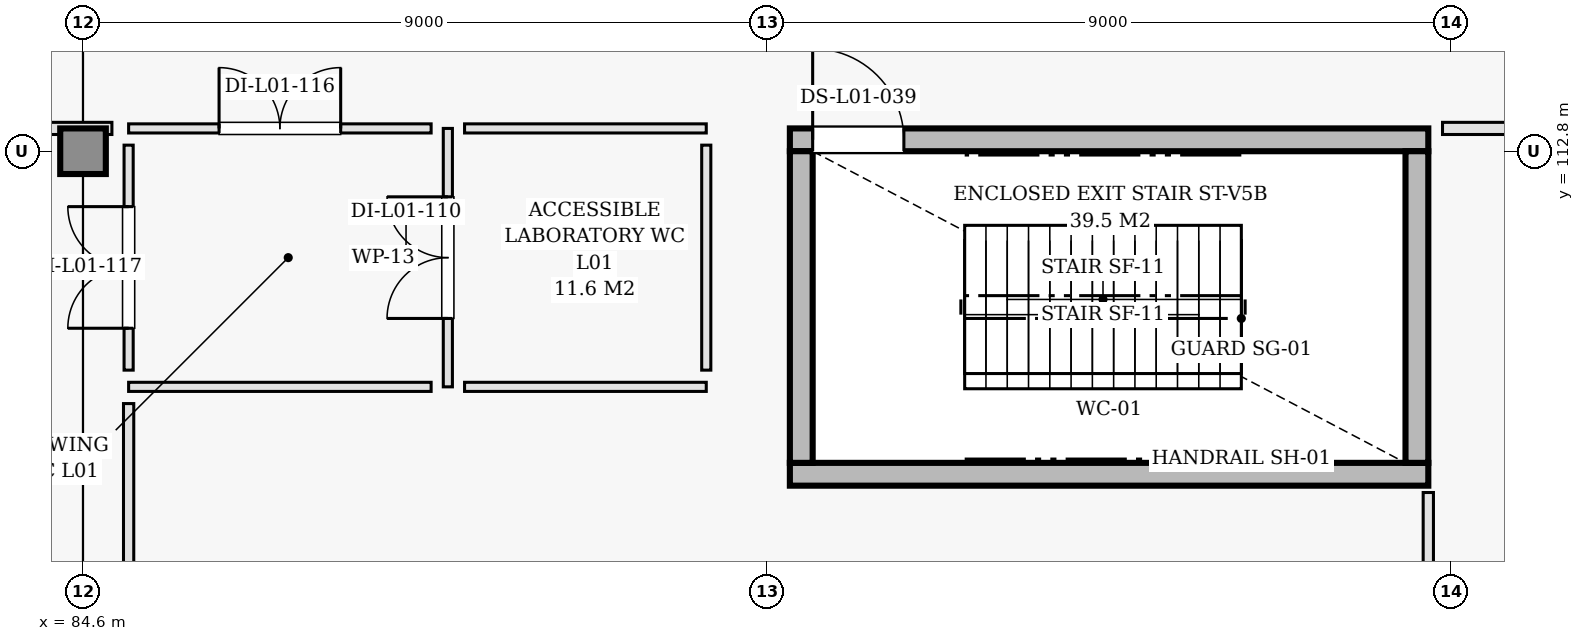
"""IFC4 building model, lengths in metres.
Left out: names, types, materials, properties, quantities, classifications, styles, units other than length and angle.
Written with IfcOpenShell. Run it as: python <this file> out.ifc"""

import sys

from ifc_helpers import new_model, si_unit, direction, frame, frame_2d, origin, origin_2d, place, context, subcontext, project, spatial, rectangle, extrude, element, fill, save


model = new_model("IFC4")
c1 = context("Model", 3, precision=1e-05, world=origin(), true_north=direction((0.0, 1.0)))
c2 = subcontext(c1, "Body", "Model", "MODEL_VIEW")
j1 = project(units=[si_unit("LENGTHUNIT", "METRE"), si_unit("PLANEANGLEUNIT", "RADIAN")], contexts=[c1])
p1 = place(None, origin())
s1 = spatial("IfcSite", under=j1, at=p1, CompositionType="ELEMENT")
p2 = place(p1, origin())
s2 = spatial("IfcBuilding", under=s1, at=p2, CompositionType="ELEMENT")
p3 = place(p2, frame((0.0, 0.0, 4.8)))
s3 = spatial("IfcBuildingStorey", under=s2, at=p3, CompositionType="ELEMENT", Elevation=4.8)
p4 = place(p3, frame((84.6, 112.8, 0.0), z_axis=(0.0, 0.0, 1.0), x_axis=(1.0, 0.0, 0.0)))
e1 = element("IfcColumn", 1, at=p4, inside=s3, PredefinedType="COLUMN", context=c2, shape_type="SweptSolid", body=[
    extrude(rectangle(XDim=0.6, YDim=0.6, at=origin_2d()), origin(), (0.0, 0.0, 1.0), 4.8),
])
p5 = place(p3, frame((93.9, 108.55, 0.0), z_axis=(0.0, 0.0, 1.0), x_axis=(1.0, 0.0, 0.0)))
e2 = element("IfcWall", 2, at=p5, inside=s3, PredefinedType="SHEAR", context=c2, shape_type="SweptSolid", body=[
    extrude(rectangle(XDim=8.4, YDim=0.3, at=frame_2d((4.2, 0.0))), origin(), (0.0, 0.0, 1.0), 4.48),
])
p6 = place(p3, frame((93.9, 112.95, 0.0), z_axis=(0.0, 0.0, 1.0), x_axis=(1.0, 0.0, 0.0)))
e3 = element("IfcWall", 3, at=p6, inside=s3, PredefinedType="SHEAR", context=c2, shape_type="SweptSolid", body=[
    extrude(rectangle(XDim=8.4, YDim=0.3, at=frame_2d((4.2, 0.0))), origin(), (0.0, 0.0, 1.0), 4.48),
])
p7 = place(p6, frame((0.3, 0.0, 0.0)))
e4 = element("IfcOpeningElement", 4, at=p7, cuts=e3, PredefinedType="OPENING", context=c2, shape_type="SweptSolid", body=[
    extrude(rectangle(XDim=1.2, YDim=2.15, at=frame_2d((0.6, 1.075))), frame((0.0, 0.16, 0.0), z_axis=(0.0, -1.0, 0.0), x_axis=(1.0, 0.0, 0.0)), (0.0, 0.0, 1.0), 0.32),
])
for number, where, z_axis, x_axis in (
    (5, (94.05, 108.7, 0.0), (0.0, 0.0, 1.0), (0.0, 1.0, 0.0)),
    (6, (102.15, 108.7, 0.0), (0.0, 0.0, 1.0), (0.0, 1.0, 0.0)),
):
    element("IfcWall", number, at=place(p3, frame(where, z_axis=z_axis, x_axis=x_axis)), inside=s3, PredefinedType="SHEAR", context=c2, shape_type="SweptSolid", body=[
        extrude(rectangle(XDim=4.1, YDim=0.3, at=frame_2d((2.05, 0.0))), origin(), (0.0, 0.0, 1.0), 4.48),
    ])
p8 = place(p3, frame((89.4, 109.7, 0.0), z_axis=(0.0, 0.0, 1.0), x_axis=(0.0, 1.0, 0.0)))
e7 = element("IfcWall", 7, at=p8, inside=s3, PredefinedType="PARTITIONING", context=c2, shape_type="SweptSolid", body=[
    extrude(rectangle(XDim=3.4, YDim=0.12, at=frame_2d((1.7, 0.0))), origin(), (0.0, 0.0, 1.0), 3.985),
])
p9 = place(p8, frame((0.9, 0.0, 0.0)))
e8 = element("IfcOpeningElement", 8, at=p9, cuts=e7, PredefinedType="OPENING", context=c2, shape_type="SweptSolid", body=[
    extrude(rectangle(XDim=1.6, YDim=2.2, at=frame_2d((0.8, 1.1))), frame((0.0, 0.07, 0.0), z_axis=(0.0, -1.0, 0.0), x_axis=(1.0, 0.0, 0.0)), (0.0, 0.0, 1.0), 0.14),
])
p10 = place(p3, frame((89.62, 109.7, 0.0), z_axis=(0.0, 0.0, 1.0), x_axis=(1.0, 0.0, 0.0)))
e9 = element("IfcWall", 9, at=p10, inside=s3, PredefinedType="PARTITIONING", context=c2, shape_type="SweptSolid", body=[
    extrude(rectangle(XDim=3.18, YDim=0.12, at=frame_2d((1.59, 0.0))), origin(), (0.0, 0.0, 1.0), 3.985),
])
p11 = place(p3, frame((89.62, 113.1, 0.0), z_axis=(0.0, 0.0, 1.0), x_axis=(1.0, 0.0, 0.0)))
e10 = element("IfcWall", 10, at=p11, inside=s3, PredefinedType="PARTITIONING", context=c2, shape_type="SweptSolid", body=[
    extrude(rectangle(XDim=3.18, YDim=0.12, at=frame_2d((1.59, 0.0))), origin(), (0.0, 0.0, 1.0), 4.48),
])
p12 = place(p3, frame((92.8, 109.92, 0.0), z_axis=(0.0, 0.0, 1.0), x_axis=(0.0, 1.0, 0.0)))
e11 = element("IfcWall", 11, at=p12, inside=s3, PredefinedType="PARTITIONING", context=c2, shape_type="SweptSolid", body=[
    extrude(rectangle(XDim=2.96, YDim=0.12, at=frame_2d((1.48, 0.0))), origin(), (0.0, 0.0, 1.0), 4.48),
])
p13 = place(p3, frame((85.2, 113.1, 0.0), z_axis=(0.0, 0.0, 1.0), x_axis=(1.0, 0.0, 0.0)))
e12 = element("IfcWall", 12, at=p13, inside=s3, PredefinedType="PARTITIONING", context=c2, shape_type="SweptSolid", body=[
    extrude(rectangle(XDim=3.98, YDim=0.12, at=frame_2d((1.99, 0.0))), origin(), (0.0, 0.0, 1.0), 4.48),
])
p14 = place(p13, frame((1.19, 0.0, 0.0)))
e13 = element("IfcOpeningElement", 13, at=p14, cuts=e12, PredefinedType="OPENING", context=c2, shape_type="SweptSolid", body=[
    extrude(rectangle(XDim=1.6, YDim=2.2, at=frame_2d((0.8, 1.1))), frame((0.0, 0.07, 0.0), z_axis=(0.0, -1.0, 0.0), x_axis=(1.0, 0.0, 0.0)), (0.0, 0.0, 1.0), 0.14),
])
p15 = place(p3, frame((85.2, 109.7, 0.0), z_axis=(0.0, 0.0, 1.0), x_axis=(1.0, 0.0, 0.0)))
e14 = element("IfcWall", 14, at=p15, inside=s3, PredefinedType="PARTITIONING", context=c2, shape_type="SweptSolid", body=[
    extrude(rectangle(XDim=3.98, YDim=0.12, at=frame_2d((1.99, 0.0))), origin(), (0.0, 0.0, 1.0), 3.985),
])
p16 = place(p3, frame((85.2, 109.92, 0.0), z_axis=(0.0, 0.0, 1.0), x_axis=(0.0, 1.0, 0.0)))
e15 = element("IfcWall", 15, at=p16, inside=s3, PredefinedType="PARTITIONING", context=c2, shape_type="SweptSolid", body=[
    extrude(rectangle(XDim=2.96, YDim=0.12, at=frame_2d((1.48, 0.0))), origin(), (0.0, 0.0, 1.0), 4.48),
])
p17 = place(p16, frame((0.551, 0.0, 0.0)))
e16 = element("IfcOpeningElement", 16, at=p17, cuts=e15, PredefinedType="OPENING", context=c2, shape_type="SweptSolid", body=[
    extrude(rectangle(XDim=1.6, YDim=2.2, at=frame_2d((0.8, 1.1))), frame((0.0, 0.07, 0.0), z_axis=(0.0, -1.0, 0.0), x_axis=(1.0, 0.0, 0.0)), (0.0, 0.0, 1.0), 0.14),
])
p18 = place(p3, frame((102.487, 113.1, 0.0), z_axis=(0.0, 0.0, 1.0), x_axis=(1.0, 0.0, 0.0)))
e17 = element("IfcWall", 17, at=p18, inside=s3, PredefinedType="PARTITIONING", context=c2, shape_type="SweptSolid", body=[
    extrude(rectangle(XDim=12.967, YDim=0.16, at=frame_2d((6.483, 0.0))), origin(), (0.0, 0.0, 1.0), 3.565),
])
p19 = place(p18, frame((5.583, 0.0, 0.0)))
e18 = element("IfcOpeningElement", 18, at=p19, cuts=e17, PredefinedType="OPENING", context=c2, shape_type="SweptSolid", body=[
    extrude(rectangle(XDim=1.8, YDim=2.2, at=frame_2d((0.9, 1.1))), frame((0.0, 0.09, 0.0), z_axis=(0.0, -1.0, 0.0), x_axis=(1.0, 0.0, 0.0)), (0.0, 0.0, 1.0), 0.18),
])
p20 = place(p3, frame((102.3, 103.855, 0.0), z_axis=(0.0, 0.0, 1.0), x_axis=(0.0, 1.0, 0.0)))
e19 = element("IfcWall", 19, at=p20, inside=s3, PredefinedType="PARTITIONING", context=c2, shape_type="SweptSolid", body=[
    extrude(rectangle(XDim=4.455, YDim=0.135, at=frame_2d((2.228, 0.0))), origin(), (0.0, 0.0, 1.0), 3.565),
])
p21 = place(p3, frame((80.146, 113.1, 0.0), z_axis=(0.0, 0.0, 1.0), x_axis=(1.0, 0.0, 0.0)))
e20 = element("IfcWall", 20, at=p21, inside=s3, PredefinedType="PARTITIONING", context=c2, shape_type="SweptSolid", body=[
    extrude(rectangle(XDim=4.834, YDim=0.16, at=frame_2d((2.417, 0.0))), origin(), (0.0, 0.0, 1.0), 3.815),
])
p22 = place(p3, frame((85.2, 103.855, 0.0), z_axis=(0.0, 0.0, 1.0), x_axis=(0.0, 1.0, 0.0)))
e21 = element("IfcWall", 21, at=p22, inside=s3, PredefinedType="PARTITIONING", context=c2, shape_type="SweptSolid", body=[
    extrude(rectangle(XDim=5.625, YDim=0.135, at=frame_2d((2.812, 0.0))), origin(), (0.0, 0.0, 1.0), 3.715),
])
p23 = place(p7, origin())
e22 = element("IfcDoor", 22, at=p23, inside=s3, OperationType="SINGLE_SWING_LEFT", PredefinedType="DOOR", context=c2, shape_type="SweptSolid", body=[
    extrude(rectangle(XDim=1.2, YDim=2.15, at=frame_2d((0.6, 1.075))), frame((0.0, 0.025, 0.0), z_axis=(0.0, -1.0, 0.0), x_axis=(1.0, 0.0, 0.0)), (0.0, 0.0, 1.0), 0.05),
])
fill(e4, e22)
p24 = place(p9, origin())
e23 = element("IfcDoor", 23, at=p24, inside=s3, OperationType="DOUBLE_DOOR_SINGLE_SWING", PredefinedType="DOOR", context=c2, shape_type="SweptSolid", body=[
    extrude(rectangle(XDim=1.6, YDim=2.2, at=frame_2d((0.8, 1.1))), frame((0.0, 0.025, 0.0), z_axis=(0.0, -1.0, 0.0), x_axis=(1.0, 0.0, 0.0)), (0.0, 0.0, 1.0), 0.05),
])
fill(e8, e23)
p25 = place(p14, origin())
e24 = element("IfcDoor", 24, at=p25, inside=s3, OperationType="DOUBLE_DOOR_SINGLE_SWING", PredefinedType="DOOR", context=c2, shape_type="SweptSolid", body=[
    extrude(rectangle(XDim=1.6, YDim=2.2, at=frame_2d((0.8, 1.1))), frame((0.0, 0.025, 0.0), z_axis=(0.0, -1.0, 0.0), x_axis=(1.0, 0.0, 0.0)), (0.0, 0.0, 1.0), 0.05),
])
fill(e13, e24)
p26 = place(p17, origin())
e25 = element("IfcDoor", 25, at=p26, inside=s3, OperationType="DOUBLE_DOOR_SINGLE_SWING", PredefinedType="DOOR", context=c2, shape_type="SweptSolid", body=[
    extrude(rectangle(XDim=1.6, YDim=2.2, at=frame_2d((0.8, 1.1))), frame((0.0, 0.025, 0.0), z_axis=(0.0, -1.0, 0.0), x_axis=(1.0, 0.0, 0.0)), (0.0, 0.0, 1.0), 0.05),
])
fill(e16, e25)
save(model, sys.argv[1])
